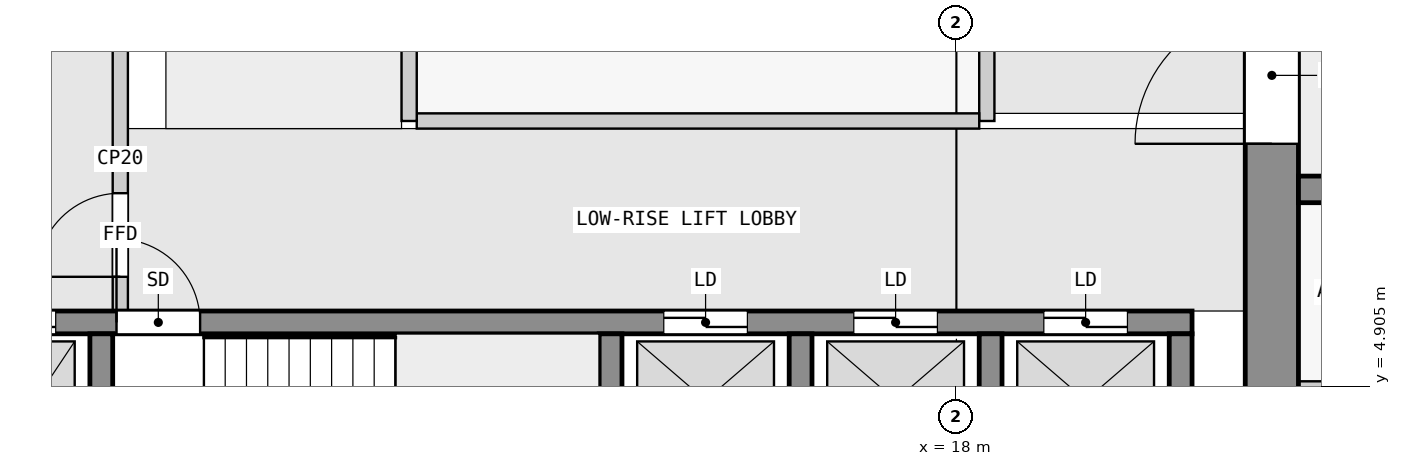
"""IFC4 building model, lengths in metres.
Left out: names, types, materials, properties, quantities, classifications, styles, units other than length and angle.
Written with IfcOpenShell. Run it as: python <this file> out.ifc"""

import sys

from ifc_helpers import new_model, si_unit, direction, frame, frame_2d, origin, place, context, subcontext, project, spatial, rectangle, extrude, element, fill, save


model = new_model("IFC4")
c1 = context("Model", 3, precision=1e-05, world=origin(), true_north=direction((0.0, 1.0)))
c2 = subcontext(c1, "Body", "Model", "MODEL_VIEW")
j1 = project(units=[si_unit("LENGTHUNIT", "METRE"), si_unit("PLANEANGLEUNIT", "RADIAN")], contexts=[c1])
p1 = place(None, origin())
s1 = spatial("IfcSite", under=j1, at=p1, CompositionType="ELEMENT")
p2 = place(p1, origin())
s2 = spatial("IfcBuilding", under=s1, at=p2, CompositionType="ELEMENT")
p3 = place(p2, frame((0.0, 0.0, 65.3)))
s3 = spatial("IfcBuildingStorey", under=s2, at=p3, CompositionType="ELEMENT", Elevation=65.3)
p4 = place(p3, frame((22.15, 2.5, 0.0), z_axis=(0.0, 0.0, 1.0), x_axis=(0.0, 1.0, 0.0)))
e1 = element("IfcWall", 1, at=p4, inside=s3, PredefinedType="SHEAR", context=c2, shape_type="SweptSolid", body=[
    extrude(rectangle(XDim=14.8, YDim=0.7, at=frame_2d((7.4, 0.0))), origin(), (0.0, 0.0, 1.0), 3.25),
])
p5 = place(p4, frame((5.6, 0.0, 0.0)))
e2 = element("IfcOpeningElement", 2, at=p5, cuts=e1, PredefinedType="OPENING", context=c2, shape_type="SweptSolid", body=[
    extrude(rectangle(XDim=1.8, YDim=2.1, at=frame_2d((0.9, 1.05))), frame((0.0, 0.36, 0.0), z_axis=(0.0, -1.0, 0.0), x_axis=(1.0, 0.0, 0.0)), (0.0, 0.0, 1.0), 0.72),
])
for number, where, z_axis, x_axis in (
    (3, (6.75, 2.8, 0.0), (0.0, 0.0, 1.0), (0.0, 1.0, 0.0)),
    (4, (13.45, 2.8, 0.0), (0.0, 0.0, 1.0), (0.0, 1.0, 0.0)),
    (5, (15.95, 2.8, 0.0), (0.0, 0.0, 1.0), (0.0, 1.0, 0.0)),
    (6, (18.45, 2.8, 0.0), (0.0, 0.0, 1.0), (0.0, 1.0, 0.0)),
    (7, (20.95, 2.8, 0.0), (0.0, 0.0, 1.0), (0.0, 1.0, 0.0)),
):
    element("IfcWall", number, at=place(p3, frame(where, z_axis=z_axis, x_axis=x_axis)), inside=s3, PredefinedType="SHEAR", context=c2, shape_type="SweptSolid", body=[
        extrude(rectangle(XDim=2.8, YDim=0.3, at=frame_2d((1.4, 0.0))), origin(), (0.0, 0.0, 1.0), 3.25),
    ])
p6 = place(p3, frame((2.3, 5.75, 0.0), z_axis=(0.0, 0.0, 1.0), x_axis=(1.0, 0.0, 0.0)))
e8 = element("IfcWall", 8, at=p6, inside=s3, PredefinedType="SHEAR", context=c2, shape_type="SweptSolid", body=[
    extrude(rectangle(XDim=18.8, YDim=0.3, at=frame_2d((9.4, 0.0))), origin(), (0.0, 0.0, 1.0), 3.25),
])
p7 = place(p6, frame((4.65, 0.0, 0.0)))
e9 = element("IfcOpeningElement", 9, at=p7, cuts=e8, PredefinedType="OPENING", context=c2, shape_type="SweptSolid", body=[
    extrude(rectangle(XDim=1.1, YDim=2.1, at=frame_2d((0.55, 1.05))), frame((0.0, 0.16, 0.0), z_axis=(0.0, -1.0, 0.0), x_axis=(1.0, 0.0, 0.0)), (0.0, 0.0, 1.0), 0.32),
])
p8 = place(p6, frame((0.45, 0.0, 0.0)))
e10 = element("IfcOpeningElement", 10, at=p8, cuts=e8, PredefinedType="OPENING", context=c2, shape_type="SweptSolid", body=[
    extrude(rectangle(XDim=1.1, YDim=2.1, at=frame_2d((0.55, 1.05))), frame((0.0, 0.16, 0.0), z_axis=(0.0, -1.0, 0.0), x_axis=(1.0, 0.0, 0.0)), (0.0, 0.0, 1.0), 0.32),
])
p9 = place(p6, frame((2.75, 0.0, 0.0)))
e11 = element("IfcOpeningElement", 11, at=p9, cuts=e8, PredefinedType="OPENING", context=c2, shape_type="SweptSolid", body=[
    extrude(rectangle(XDim=1.1, YDim=2.1, at=frame_2d((0.55, 1.05))), frame((0.0, 0.16, 0.0), z_axis=(0.0, -1.0, 0.0), x_axis=(1.0, 0.0, 0.0)), (0.0, 0.0, 1.0), 0.32),
])
p10 = place(p6, frame((11.85, 0.0, 0.0)))
e12 = element("IfcOpeningElement", 12, at=p10, cuts=e8, PredefinedType="OPENING", context=c2, shape_type="SweptSolid", body=[
    extrude(rectangle(XDim=1.1, YDim=2.1, at=frame_2d((0.55, 1.05))), frame((0.0, 0.16, 0.0), z_axis=(0.0, -1.0, 0.0), x_axis=(1.0, 0.0, 0.0)), (0.0, 0.0, 1.0), 0.32),
])
p11 = place(p6, frame((14.35, 0.0, 0.0)))
e13 = element("IfcOpeningElement", 13, at=p11, cuts=e8, PredefinedType="OPENING", context=c2, shape_type="SweptSolid", body=[
    extrude(rectangle(XDim=1.1, YDim=2.1, at=frame_2d((0.55, 1.05))), frame((0.0, 0.16, 0.0), z_axis=(0.0, -1.0, 0.0), x_axis=(1.0, 0.0, 0.0)), (0.0, 0.0, 1.0), 0.32),
])
p12 = place(p6, frame((16.85, 0.0, 0.0)))
e14 = element("IfcOpeningElement", 14, at=p12, cuts=e8, PredefinedType="OPENING", context=c2, shape_type="SweptSolid", body=[
    extrude(rectangle(XDim=1.1, YDim=2.1, at=frame_2d((0.55, 1.05))), frame((0.0, 0.16, 0.0), z_axis=(0.0, -1.0, 0.0), x_axis=(1.0, 0.0, 0.0)), (0.0, 0.0, 1.0), 0.32),
])
p13 = place(p3, frame((22.5, 7.5, 0.0), z_axis=(0.0, 0.0, 1.0), x_axis=(1.0, 0.0, 0.0)))
e15 = element("IfcWall", 15, at=p13, inside=s3, PredefinedType="SHEAR", context=c2, shape_type="SweptSolid", body=[
    extrude(rectangle(XDim=22.5, YDim=0.35, at=frame_2d((11.25, 0.0))), origin(), (0.0, 0.0, 1.0), 3.25),
])
p14 = place(p13, frame((9.55, 0.0, 0.0)))
e16 = element("IfcOpeningElement", 16, at=p14, cuts=e15, PredefinedType="OPENING", context=c2, shape_type="SweptSolid", body=[
    extrude(rectangle(XDim=1.0, YDim=2.1, at=frame_2d((0.5, 1.05))), frame((0.0, 0.185, 0.0), z_axis=(0.0, -1.0, 0.0), x_axis=(1.0, 0.0, 0.0)), (0.0, 0.0, 1.0), 0.37),
])
p15 = place(p13, frame((18.75, 0.0, 0.0)))
e17 = element("IfcOpeningElement", 17, at=p15, cuts=e15, PredefinedType="OPENING", context=c2, shape_type="SweptSolid", body=[
    extrude(rectangle(XDim=0.9, YDim=2.1, at=frame_2d((0.45, 1.05))), frame((0.0, 0.185, 0.0), z_axis=(0.0, -1.0, 0.0), x_axis=(1.0, 0.0, 0.0)), (0.0, 0.0, 1.0), 0.37),
])
p16 = place(p13, frame((20.95, 0.0, 0.0)))
e18 = element("IfcOpeningElement", 18, at=p16, cuts=e15, PredefinedType="OPENING", context=c2, shape_type="SweptSolid", body=[
    extrude(rectangle(XDim=1.0, YDim=2.1, at=frame_2d((0.5, 1.05))), frame((0.0, 0.185, 0.0), z_axis=(0.0, -1.0, 0.0), x_axis=(1.0, 0.0, 0.0)), (0.0, 0.0, 1.0), 0.37),
])
p17 = place(p3, frame((7.0, 5.9, 0.0), z_axis=(0.0, 0.0, 1.0), x_axis=(0.0, 1.0, 0.0)))
e19 = element("IfcWall", 19, at=p17, inside=s3, PredefinedType="PARTITIONING", context=c2, shape_type="SweptSolid", body=[
    extrude(rectangle(XDim=4.0, YDim=0.2, at=frame_2d((2.0, 0.0))), origin(), (0.0, 0.0, 1.0), 3.25),
])
p18 = place(p17, frame((0.45, 0.0, 0.0)))
e20 = element("IfcOpeningElement", 20, at=p18, cuts=e19, PredefinedType="OPENING", context=c2, shape_type="SweptSolid", body=[
    extrude(rectangle(XDim=1.1, YDim=2.1, at=frame_2d((0.55, 1.05))), frame((0.0, 0.11, 0.0), z_axis=(0.0, -1.0, 0.0), x_axis=(1.0, 0.0, 0.0)), (0.0, 0.0, 1.0), 0.22),
])
p19 = place(p3, frame((10.8, 8.4, 0.0), z_axis=(0.0, 0.0, 1.0), x_axis=(0.0, 1.0, 0.0)))
e21 = element("IfcWall", 21, at=p19, inside=s3, PredefinedType="PARTITIONING", context=c2, shape_type="SweptSolid", body=[
    extrude(rectangle(XDim=6.2, YDim=0.2, at=frame_2d((3.1, 0.0))), origin(), (0.0, 0.0, 1.0), 3.25),
])
p20 = place(p3, frame((10.9, 8.4, 0.0), z_axis=(0.0, 0.0, 1.0), x_axis=(1.0, 0.0, 0.0)))
e22 = element("IfcWall", 22, at=p20, inside=s3, PredefinedType="PARTITIONING", context=c2, shape_type="SweptSolid", body=[
    extrude(rectangle(XDim=7.4, YDim=0.2, at=frame_2d((3.7, 0.0))), origin(), (0.0, 0.0, 1.0), 3.25),
])
p21 = place(p3, frame((18.4, 8.4, 0.0), z_axis=(0.0, 0.0, 1.0), x_axis=(0.0, 1.0, 0.0)))
e23 = element("IfcWall", 23, at=p21, inside=s3, PredefinedType="PARTITIONING", context=c2, shape_type="SweptSolid", body=[
    extrude(rectangle(XDim=6.2, YDim=0.2, at=frame_2d((3.1, 0.0))), origin(), (0.0, 0.0, 1.0), 3.25),
])
p22 = place(p21, frame((0.95, 0.0, 0.0)))
e24 = element("IfcOpeningElement", 24, at=p22, cuts=e23, PredefinedType="OPENING", context=c2, shape_type="SweptSolid", body=[
    extrude(rectangle(XDim=0.9, YDim=2.1, at=frame_2d((0.45, 1.05))), frame((0.0, 0.11, 0.0), z_axis=(0.0, -1.0, 0.0), x_axis=(1.0, 0.0, 0.0)), (0.0, 0.0, 1.0), 0.22),
])
p23 = place(p21, frame((4.05, 0.0, 0.0)))
e25 = element("IfcOpeningElement", 25, at=p23, cuts=e23, PredefinedType="OPENING", context=c2, shape_type="SweptSolid", body=[
    extrude(rectangle(XDim=0.9, YDim=2.1, at=frame_2d((0.45, 1.05))), frame((0.0, 0.11, 0.0), z_axis=(0.0, -1.0, 0.0), x_axis=(1.0, 0.0, 0.0)), (0.0, 0.0, 1.0), 0.22),
])
p24 = place(p3, frame((22.5, 4.925, 0.0), z_axis=(0.0, 0.0, 1.0), x_axis=(1.0, 0.0, 0.0)))
e26 = element("IfcWall", 26, at=p24, inside=s3, PredefinedType="PARTITIONING", context=c2, shape_type="SweptSolid", body=[
    extrude(rectangle(XDim=3.9, YDim=0.1, at=frame_2d((1.95, 0.0))), origin(), (0.0, 0.0, 1.0), 3.25),
])
p25 = place(p18, origin())
e27 = element("IfcDoor", 27, at=p25, inside=s3, OperationType="SINGLE_SWING_LEFT", PredefinedType="DOOR", context=c2, shape_type="SweptSolid", body=[
    extrude(rectangle(XDim=1.1, YDim=2.1, at=frame_2d((0.55, 1.05))), frame((0.0, 0.025, 0.0), z_axis=(0.0, -1.0, 0.0), x_axis=(1.0, 0.0, 0.0)), (0.0, 0.0, 1.0), 0.05),
])
fill(e20, e27)
p26 = place(p7, origin())
e28 = element("IfcDoor", 28, at=p26, inside=s3, OperationType="SINGLE_SWING_LEFT", PredefinedType="DOOR", context=c2, shape_type="SweptSolid", body=[
    extrude(rectangle(XDim=1.1, YDim=2.1, at=frame_2d((0.55, 1.05))), frame((0.0, 0.025, 0.0), z_axis=(0.0, -1.0, 0.0), x_axis=(1.0, 0.0, 0.0)), (0.0, 0.0, 1.0), 0.05),
])
fill(e9, e28)
p27 = place(p9, origin())
e29 = element("IfcDoor", 29, at=p27, inside=s3, OperationType="DOUBLE_DOOR_SLIDING", PredefinedType="DOOR", context=c2, shape_type="SweptSolid", body=[
    extrude(rectangle(XDim=1.1, YDim=2.1, at=frame_2d((0.55, 1.05))), frame((0.0, 0.025, 0.0), z_axis=(0.0, -1.0, 0.0), x_axis=(1.0, 0.0, 0.0)), (0.0, 0.0, 1.0), 0.05),
])
fill(e11, e29)
p28 = place(p10, origin())
e30 = element("IfcDoor", 30, at=p28, inside=s3, OperationType="DOUBLE_DOOR_SLIDING", PredefinedType="DOOR", context=c2, shape_type="SweptSolid", body=[
    extrude(rectangle(XDim=1.1, YDim=2.1, at=frame_2d((0.55, 1.05))), frame((0.0, 0.025, 0.0), z_axis=(0.0, -1.0, 0.0), x_axis=(1.0, 0.0, 0.0)), (0.0, 0.0, 1.0), 0.05),
])
fill(e12, e30)
p29 = place(p11, origin())
e31 = element("IfcDoor", 31, at=p29, inside=s3, OperationType="DOUBLE_DOOR_SLIDING", PredefinedType="DOOR", context=c2, shape_type="SweptSolid", body=[
    extrude(rectangle(XDim=1.1, YDim=2.1, at=frame_2d((0.55, 1.05))), frame((0.0, 0.025, 0.0), z_axis=(0.0, -1.0, 0.0), x_axis=(1.0, 0.0, 0.0)), (0.0, 0.0, 1.0), 0.05),
])
fill(e13, e31)
p30 = place(p12, origin())
e32 = element("IfcDoor", 32, at=p30, inside=s3, OperationType="DOUBLE_DOOR_SLIDING", PredefinedType="DOOR", context=c2, shape_type="SweptSolid", body=[
    extrude(rectangle(XDim=1.1, YDim=2.1, at=frame_2d((0.55, 1.05))), frame((0.0, 0.025, 0.0), z_axis=(0.0, -1.0, 0.0), x_axis=(1.0, 0.0, 0.0)), (0.0, 0.0, 1.0), 0.05),
])
fill(e14, e32)
p31 = place(p5, origin())
e33 = element("IfcDoor", 33, at=p31, inside=s3, OperationType="DOUBLE_DOOR_SINGLE_SWING", PredefinedType="DOOR", context=c2, shape_type="SweptSolid", body=[
    extrude(rectangle(XDim=1.8, YDim=2.1, at=frame_2d((0.9, 1.05))), frame((0.0, 0.025, 0.0), z_axis=(0.0, -1.0, 0.0), x_axis=(1.0, 0.0, 0.0)), (0.0, 0.0, 1.0), 0.05),
])
fill(e2, e33)
save(model, sys.argv[1])
